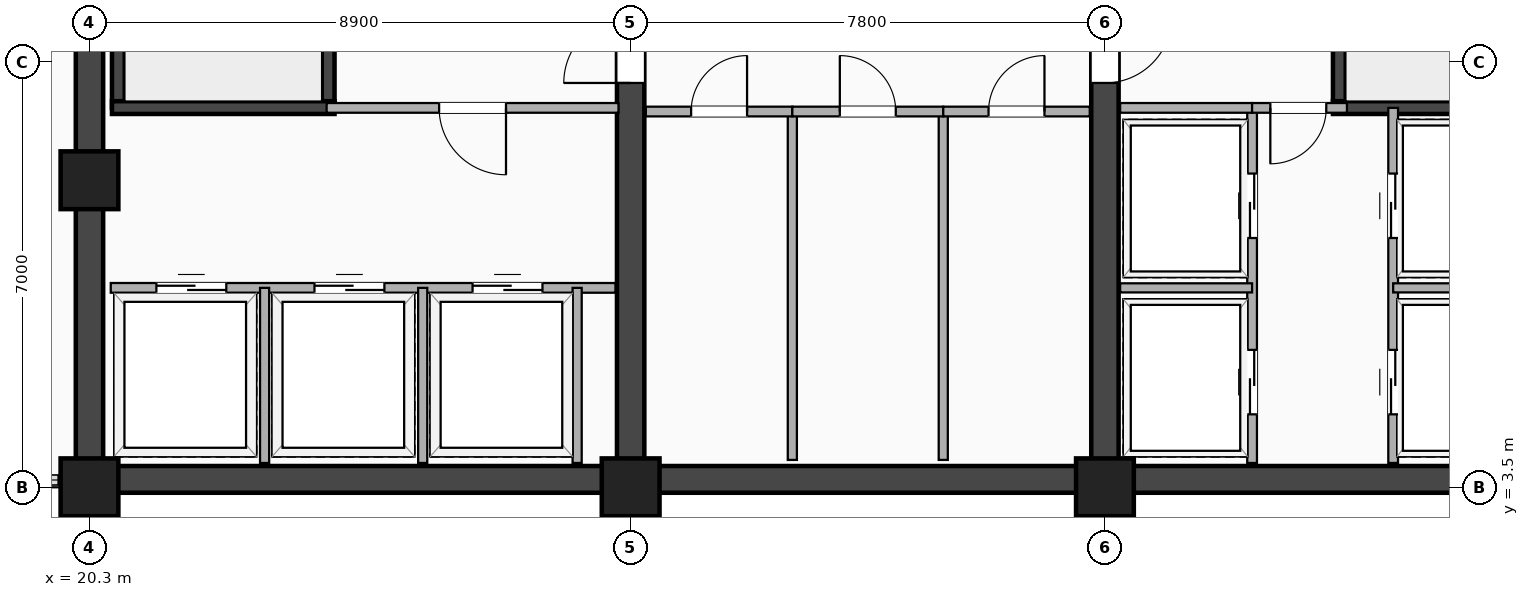
"""IFC4 building model, lengths in metres.
Left out: names, types, materials, properties, quantities, classifications, styles, units other than length and angle.
Written with IfcOpenShell. Run it as: python <this file> out.ifc"""

import sys

from ifc_helpers import new_model, si_unit, direction, frame, frame_2d, origin, origin_2d, place, context, subcontext, project, spatial, rectangle, extrude, element, fill, save


model = new_model("IFC4")
c1 = context("Model", 3, precision=1e-05, world=origin(), true_north=direction((0.0, 1.0)))
c2 = subcontext(c1, "Body", "Model", "MODEL_VIEW")
j1 = project(units=[si_unit("LENGTHUNIT", "METRE"), si_unit("PLANEANGLEUNIT", "RADIAN")], contexts=[c1])
p1 = place(None, origin())
s1 = spatial("IfcSite", under=j1, at=p1, CompositionType="ELEMENT")
p2 = place(p1, origin())
s2 = spatial("IfcBuilding", under=s1, at=p2, CompositionType="ELEMENT")
p3 = place(p2, frame((0.0, 0.0, 224.9)))
s3 = spatial("IfcBuildingStorey", under=s2, at=p3, CompositionType="ELEMENT", Elevation=224.9)
p4 = place(p3, frame((20.3, 3.63, 0.0), z_axis=(0.0, 0.0, 1.0), x_axis=(1.0, 0.0, 0.0)))
e1 = element("IfcWall", 1, at=p4, inside=s3, PredefinedType="SHEAR", context=c2, shape_type="SweptSolid", body=[
    extrude(rectangle(XDim=24.5, YDim=0.44, at=frame_2d((12.25, 0.0))), origin(), (0.0, 0.0, 1.0), 3.26),
])
p5 = place(p3, frame((20.3, 3.5, 0.0), z_axis=(0.0, 0.0, 1.0), x_axis=(0.0, 1.0, 0.0)))
e2 = element("IfcWall", 2, at=p5, inside=s3, PredefinedType="SHEAR", context=c2, shape_type="SweptSolid", body=[
    extrude(rectangle(XDim=16.9, YDim=0.45, at=frame_2d((8.45, 0.0))), origin(), (0.0, 0.0, 1.0), 3.26),
])
p6 = place(p3, frame((29.2, 3.5, 0.0), z_axis=(0.0, 0.0, 1.0), x_axis=(0.0, 1.0, 0.0)))
e3 = element("IfcWall", 3, at=p6, inside=s3, PredefinedType="SHEAR", context=c2, shape_type="SweptSolid", body=[
    extrude(rectangle(XDim=14.95, YDim=0.45, at=frame_2d((7.475, 0.0))), origin(), (0.0, 0.0, 1.0), 3.26),
])
p7 = place(p6, frame((7.75, 0.0, 0.0), z_axis=(0.0, 0.0, 1.0), x_axis=(-1.0, 0.0, 0.0)))
e4 = element("IfcOpeningElement", 4, at=p7, cuts=e3, PredefinedType="OPENING", context=c2, shape_type="SweptSolid", body=[
    extrude(rectangle(XDim=1.1, YDim=2.15, at=frame_2d((0.55, 1.075))), frame((0.0, 0.235, 0.0), z_axis=(0.0, -1.0, 0.0), x_axis=(1.0, 0.0, 0.0)), (0.0, 0.0, 1.0), 0.47),
])
p8 = place(p3, frame((37.0, 3.5, 0.0), z_axis=(0.0, 0.0, 1.0), x_axis=(0.0, 1.0, 0.0)))
e5 = element("IfcWall", 5, at=p8, inside=s3, PredefinedType="SHEAR", context=c2, shape_type="SweptSolid", body=[
    extrude(rectangle(XDim=14.95, YDim=0.45, at=frame_2d((7.475, 0.0))), origin(), (0.0, 0.0, 1.0), 3.26),
])
p9 = place(p8, frame((6.65, 0.0, 0.0)))
e6 = element("IfcOpeningElement", 6, at=p9, cuts=e5, PredefinedType="OPENING", context=c2, shape_type="SweptSolid", body=[
    extrude(rectangle(XDim=1.1, YDim=2.15, at=frame_2d((0.55, 1.075))), frame((0.0, 0.235, 0.0), z_axis=(0.0, -1.0, 0.0), x_axis=(1.0, 0.0, 0.0)), (0.0, 0.0, 1.0), 0.47),
])
for number, where, z_axis, x_axis in (
    (7, (20.775, 9.745, 0.0), (0.0, 0.0, 1.0), (0.0, 1.0, 0.0)),
    (8, (24.225, 9.745, 0.0), (0.0, 0.0, 1.0), (0.0, 1.0, 0.0)),
):
    element("IfcWall", number, at=place(p3, frame(where, z_axis=z_axis, x_axis=x_axis)), inside=s3, PredefinedType="SHEAR", context=c2, shape_type="SweptSolid", body=[
        extrude(rectangle(XDim=8.01, YDim=0.21, at=frame_2d((4.005, 0.0))), origin(), (0.0, 0.0, 1.0), 3.26),
    ])
p10 = place(p3, frame((20.67, 9.745, 0.0), z_axis=(0.0, 0.0, 1.0), x_axis=(1.0, 0.0, 0.0)))
e9 = element("IfcWall", 9, at=p10, inside=s3, PredefinedType="SHEAR", context=c2, shape_type="SweptSolid", body=[
    extrude(rectangle(XDim=3.66, YDim=0.21, at=frame_2d((1.83, 0.0))), origin(), (0.0, 0.0, 1.0), 3.26),
])
p11 = place(p3, frame((40.855, 9.745, 0.0), z_axis=(0.0, 0.0, 1.0), x_axis=(0.0, 1.0, 0.0)))
e10 = element("IfcWall", 10, at=p11, inside=s3, PredefinedType="SHEAR", context=c2, shape_type="SweptSolid", body=[
    extrude(rectangle(XDim=8.01, YDim=0.21, at=frame_2d((4.005, 0.0))), origin(), (0.0, 0.0, 1.0), 3.26),
])
p12 = place(p3, frame((40.75, 9.745, 0.0), z_axis=(0.0, 0.0, 1.0), x_axis=(1.0, 0.0, 0.0)))
e11 = element("IfcWall", 11, at=p12, inside=s3, PredefinedType="SHEAR", context=c2, shape_type="SweptSolid", body=[
    extrude(rectangle(XDim=3.66, YDim=0.21, at=frame_2d((1.83, 0.0))), origin(), (0.0, 0.0, 1.0), 3.26),
])
for number, where, z_axis, x_axis in (
    (12, (20.3, 3.5, -0.24), (0.0, 0.0, 1.0), (1.0, 0.0, 0.0)),
    (13, (29.2, 3.5, -0.24), (0.0, 0.0, 1.0), (1.0, 0.0, 0.0)),
    (14, (37.0, 3.5, -0.24), (0.0, 0.0, 1.0), (1.0, 0.0, 0.0)),
    (15, (20.3, 8.55, -0.24), (0.0, 0.0, 1.0), (1.0, 0.0, 0.0)),
):
    element("IfcColumn", number, at=place(p3, frame(where, z_axis=z_axis, x_axis=x_axis)), inside=s3, PredefinedType="COLUMN", context=c2, shape_type="SweptSolid", body=[
        extrude(rectangle(XDim=0.95, YDim=0.95, at=origin_2d()), origin(), (0.0, 0.0, 1.0), 3.5),
    ])
p13 = place(p3, frame((20.65, 6.78, 0.0), z_axis=(0.0, 0.0, 1.0), x_axis=(1.0, 0.0, 0.0)))
e16 = element("IfcWall", 16, at=p13, inside=s3, PredefinedType="PARTITIONING", context=c2, shape_type="SweptSolid", body=[
    extrude(rectangle(XDim=8.3, YDim=0.16, at=frame_2d((4.15, 0.0))), origin(), (0.0, 0.0, 1.0), 2.472),
])
p14 = place(p13, frame((0.75, 0.0, 0.0)))
e17 = element("IfcOpeningElement", 17, at=p14, cuts=e16, PredefinedType="OPENING", context=c2, shape_type="SweptSolid", body=[
    extrude(rectangle(XDim=1.15, YDim=2.2, at=frame_2d((0.575, 1.1))), frame((0.0, 0.09, 0.0), z_axis=(0.0, -1.0, 0.0), x_axis=(1.0, 0.0, 0.0)), (0.0, 0.0, 1.0), 0.18),
])
p15 = place(p13, frame((3.35, 0.0, 0.0)))
e18 = element("IfcOpeningElement", 18, at=p15, cuts=e16, PredefinedType="OPENING", context=c2, shape_type="SweptSolid", body=[
    extrude(rectangle(XDim=1.15, YDim=2.2, at=frame_2d((0.575, 1.1))), frame((0.0, 0.09, 0.0), z_axis=(0.0, -1.0, 0.0), x_axis=(1.0, 0.0, 0.0)), (0.0, 0.0, 1.0), 0.18),
])
p16 = place(p13, frame((5.95, 0.0, 0.0)))
e19 = element("IfcOpeningElement", 19, at=p16, cuts=e16, PredefinedType="OPENING", context=c2, shape_type="SweptSolid", body=[
    extrude(rectangle(XDim=1.15, YDim=2.2, at=frame_2d((0.575, 1.1))), frame((0.0, 0.09, 0.0), z_axis=(0.0, -1.0, 0.0), x_axis=(1.0, 0.0, 0.0)), (0.0, 0.0, 1.0), 0.18),
])
for number, where, z_axis, x_axis in (
    (20, (23.18, 3.9, 0.0), (0.0, 0.0, 1.0), (0.0, 1.0, 0.0)),
    (21, (25.78, 3.9, 0.0), (0.0, 0.0, 1.0), (0.0, 1.0, 0.0)),
    (22, (28.32, 3.9, 0.0), (0.0, 0.0, 1.0), (0.0, 1.0, 0.0)),
):
    element("IfcWall", number, at=place(p3, frame(where, z_axis=z_axis, x_axis=x_axis)), inside=s3, PredefinedType="PARTITIONING", context=c2, shape_type="SweptSolid", body=[
        extrude(rectangle(XDim=2.88, YDim=0.15, at=frame_2d((1.44, 0.0))), origin(), (0.0, 0.0, 1.0), 3.26),
    ])
p17 = place(p3, frame((24.2, 9.74, 0.0), z_axis=(0.0, 0.0, 1.0), x_axis=(1.0, 0.0, 0.0)))
e23 = element("IfcWall", 23, at=p17, inside=s3, PredefinedType="PARTITIONING", context=c2, shape_type="SweptSolid", body=[
    extrude(rectangle(XDim=4.8, YDim=0.16, at=frame_2d((2.4, 0.0))), origin(), (0.0, 0.0, 1.0), 3.26),
])
p18 = place(p17, frame((1.85, 0.0, 0.0)))
e24 = element("IfcOpeningElement", 24, at=p18, cuts=e23, PredefinedType="OPENING", context=c2, shape_type="SweptSolid", body=[
    extrude(rectangle(XDim=1.1, YDim=2.15, at=frame_2d((0.55, 1.075))), frame((0.0, 0.09, 0.0), z_axis=(0.0, -1.0, 0.0), x_axis=(1.0, 0.0, 0.0)), (0.0, 0.0, 1.0), 0.18),
])
p19 = place(p3, frame((39.42, 3.9, 0.0), z_axis=(0.0, 0.0, 1.0), x_axis=(0.0, 1.0, 0.0)))
e25 = element("IfcWall", 25, at=p19, inside=s3, PredefinedType="PARTITIONING", context=c2, shape_type="SweptSolid", body=[
    extrude(rectangle(XDim=5.84, YDim=0.16, at=frame_2d((2.92, 0.0))), origin(), (0.0, 0.0, 1.0), 3.26),
])
p20 = place(p19, frame((1.86, 0.0, 0.0), z_axis=(0.0, 0.0, 1.0), x_axis=(-1.0, 0.0, 0.0)))
e26 = element("IfcOpeningElement", 26, at=p20, cuts=e25, PredefinedType="OPENING", context=c2, shape_type="SweptSolid", body=[
    extrude(rectangle(XDim=1.06, YDim=2.16, at=frame_2d((0.53, 1.08))), frame((0.0, 0.09, 0.0), z_axis=(0.0, -1.0, 0.0), x_axis=(1.0, 0.0, 0.0)), (0.0, 0.0, 1.0), 0.18),
])
p21 = place(p19, frame((4.76, 0.0, 0.0), z_axis=(0.0, 0.0, 1.0), x_axis=(-1.0, 0.0, 0.0)))
e27 = element("IfcOpeningElement", 27, at=p21, cuts=e25, PredefinedType="OPENING", context=c2, shape_type="SweptSolid", body=[
    extrude(rectangle(XDim=1.06, YDim=2.16, at=frame_2d((0.53, 1.08))), frame((0.0, 0.09, 0.0), z_axis=(0.0, -1.0, 0.0), x_axis=(1.0, 0.0, 0.0)), (0.0, 0.0, 1.0), 0.18),
])
p22 = place(p3, frame((41.74, 3.9, 0.0), z_axis=(0.0, 0.0, 1.0), x_axis=(0.0, 1.0, 0.0)))
e28 = element("IfcWall", 28, at=p22, inside=s3, PredefinedType="PARTITIONING", context=c2, shape_type="SweptSolid", body=[
    extrude(rectangle(XDim=5.84, YDim=0.16, at=frame_2d((2.92, 0.0))), origin(), (0.0, 0.0, 1.0), 3.26),
])
p23 = place(p22, frame((0.8, 0.0, 0.0)))
e29 = element("IfcOpeningElement", 29, at=p23, cuts=e28, PredefinedType="OPENING", context=c2, shape_type="SweptSolid", body=[
    extrude(rectangle(XDim=1.06, YDim=2.16, at=frame_2d((0.53, 1.08))), frame((0.0, 0.09, 0.0), z_axis=(0.0, -1.0, 0.0), x_axis=(1.0, 0.0, 0.0)), (0.0, 0.0, 1.0), 0.18),
])
p24 = place(p22, frame((3.7, 0.0, 0.0)))
e30 = element("IfcOpeningElement", 30, at=p24, cuts=e28, PredefinedType="OPENING", context=c2, shape_type="SweptSolid", body=[
    extrude(rectangle(XDim=1.06, YDim=2.16, at=frame_2d((0.53, 1.08))), frame((0.0, 0.09, 0.0), z_axis=(0.0, -1.0, 0.0), x_axis=(1.0, 0.0, 0.0)), (0.0, 0.0, 1.0), 0.18),
])
p25 = place(p3, frame((37.25, 6.78, 0.0), z_axis=(0.0, 0.0, 1.0), x_axis=(1.0, 0.0, 0.0)))
e31 = element("IfcWall", 31, at=p25, inside=s3, PredefinedType="PARTITIONING", context=c2, shape_type="SweptSolid", body=[
    extrude(rectangle(XDim=2.17, YDim=0.15, at=frame_2d((1.085, 0.0))), origin(), (0.0, 0.0, 1.0), 3.26),
])
p26 = place(p3, frame((41.74, 6.78, 0.0), z_axis=(0.0, 0.0, 1.0), x_axis=(1.0, 0.0, 0.0)))
e32 = element("IfcWall", 32, at=p26, inside=s3, PredefinedType="PARTITIONING", context=c2, shape_type="SweptSolid", body=[
    extrude(rectangle(XDim=2.66, YDim=0.15, at=frame_2d((1.33, 0.0))), origin(), (0.0, 0.0, 1.0), 2.472),
])
p27 = place(p3, frame((37.25, 9.74, 0.0), z_axis=(0.0, 0.0, 1.0), x_axis=(1.0, 0.0, 0.0)))
e33 = element("IfcWall", 33, at=p27, inside=s3, PredefinedType="PARTITIONING", context=c2, shape_type="SweptSolid", body=[
    extrude(rectangle(XDim=2.17, YDim=0.16, at=frame_2d((1.085, 0.0))), origin(), (0.0, 0.0, 1.0), 3.26),
])
p28 = place(p3, frame((39.42, 9.74, 0.0), z_axis=(0.0, 0.0, 1.0), x_axis=(1.0, 0.0, 0.0)))
e34 = element("IfcWall", 34, at=p28, inside=s3, PredefinedType="PARTITIONING", context=c2, shape_type="SweptSolid", body=[
    extrude(rectangle(XDim=1.56, YDim=0.16, at=frame_2d((0.78, 0.0))), origin(), (0.0, 0.0, 1.0), 3.26),
])
p29 = place(p28, frame((0.3, 0.0, 0.0)))
e35 = element("IfcOpeningElement", 35, at=p29, cuts=e34, PredefinedType="OPENING", context=c2, shape_type="SweptSolid", body=[
    extrude(rectangle(XDim=0.92, YDim=2.08, at=frame_2d((0.46, 1.04))), frame((0.0, 0.09, 0.0), z_axis=(0.0, -1.0, 0.0), x_axis=(1.0, 0.0, 0.0)), (0.0, 0.0, 1.0), 0.18),
])
p30 = place(p3, frame((31.859, 3.95, 0.0), z_axis=(0.0, 0.0, 1.0), x_axis=(0.0, 1.0, 0.0)))
e36 = element("IfcWall", 36, at=p30, inside=s3, PredefinedType="PARTITIONING", context=c2, shape_type="SweptSolid", body=[
    extrude(rectangle(XDim=5.73, YDim=0.15, at=frame_2d((2.865, 0.0))), origin(), (0.0, 0.0, 1.0), 3.26),
])
p31 = place(p3, frame((29.45, 9.68, 0.0), z_axis=(0.0, 0.0, 1.0), x_axis=(1.0, 0.0, 0.0)))
e37 = element("IfcWall", 37, at=p31, inside=s3, PredefinedType="PARTITIONING", context=c2, shape_type="SweptSolid", body=[
    extrude(rectangle(XDim=2.409, YDim=0.16, at=frame_2d((1.205, 0.0))), origin(), (0.0, 0.0, 1.0), 3.26),
])
p32 = place(p31, frame((1.664, 0.0, 0.0), z_axis=(0.0, 0.0, 1.0), x_axis=(-1.0, 0.0, 0.0)))
e38 = element("IfcOpeningElement", 38, at=p32, cuts=e37, PredefinedType="OPENING", context=c2, shape_type="SweptSolid", body=[
    extrude(rectangle(XDim=0.92, YDim=2.08, at=frame_2d((0.46, 1.04))), frame((0.0, 0.09, 0.0), z_axis=(0.0, -1.0, 0.0), x_axis=(1.0, 0.0, 0.0)), (0.0, 0.0, 1.0), 0.18),
])
p33 = place(p3, frame((34.341, 3.95, 0.0), z_axis=(0.0, 0.0, 1.0), x_axis=(0.0, 1.0, 0.0)))
e39 = element("IfcWall", 39, at=p33, inside=s3, PredefinedType="PARTITIONING", context=c2, shape_type="SweptSolid", body=[
    extrude(rectangle(XDim=5.73, YDim=0.15, at=frame_2d((2.865, 0.0))), origin(), (0.0, 0.0, 1.0), 3.26),
])
p34 = place(p3, frame((31.859, 9.68, 0.0), z_axis=(0.0, 0.0, 1.0), x_axis=(1.0, 0.0, 0.0)))
e40 = element("IfcWall", 40, at=p34, inside=s3, PredefinedType="PARTITIONING", context=c2, shape_type="SweptSolid", body=[
    extrude(rectangle(XDim=2.482, YDim=0.16, at=frame_2d((1.241, 0.0))), origin(), (0.0, 0.0, 1.0), 3.26),
])
p35 = place(p34, frame((1.701, 0.0, 0.0), z_axis=(0.0, 0.0, 1.0), x_axis=(-1.0, 0.0, 0.0)))
e41 = element("IfcOpeningElement", 41, at=p35, cuts=e40, PredefinedType="OPENING", context=c2, shape_type="SweptSolid", body=[
    extrude(rectangle(XDim=0.92, YDim=2.08, at=frame_2d((0.46, 1.04))), frame((0.0, 0.09, 0.0), z_axis=(0.0, -1.0, 0.0), x_axis=(1.0, 0.0, 0.0)), (0.0, 0.0, 1.0), 0.18),
])
p36 = place(p3, frame((34.341, 9.68, 0.0), z_axis=(0.0, 0.0, 1.0), x_axis=(1.0, 0.0, 0.0)))
e42 = element("IfcWall", 42, at=p36, inside=s3, PredefinedType="PARTITIONING", context=c2, shape_type="SweptSolid", body=[
    extrude(rectangle(XDim=2.409, YDim=0.16, at=frame_2d((1.205, 0.0))), origin(), (0.0, 0.0, 1.0), 3.26),
])
p37 = place(p36, frame((1.664, 0.0, 0.0), z_axis=(0.0, 0.0, 1.0), x_axis=(-1.0, 0.0, 0.0)))
e43 = element("IfcOpeningElement", 43, at=p37, cuts=e42, PredefinedType="OPENING", context=c2, shape_type="SweptSolid", body=[
    extrude(rectangle(XDim=0.92, YDim=2.08, at=frame_2d((0.46, 1.04))), frame((0.0, 0.09, 0.0), z_axis=(0.0, -1.0, 0.0), x_axis=(1.0, 0.0, 0.0)), (0.0, 0.0, 1.0), 0.18),
])
p38 = place(p7, origin())
e44 = element("IfcDoor", 44, at=p38, inside=s3, OperationType="SINGLE_SWING_LEFT", PredefinedType="DOOR", context=c2, shape_type="SweptSolid", body=[
    extrude(rectangle(XDim=1.1, YDim=2.15, at=frame_2d((0.55, 1.075))), frame((0.0, 0.025, 0.0), z_axis=(0.0, -1.0, 0.0), x_axis=(1.0, 0.0, 0.0)), (0.0, 0.0, 1.0), 0.05),
])
fill(e4, e44)
p39 = place(p9, origin())
e45 = element("IfcDoor", 45, at=p39, inside=s3, OperationType="SINGLE_SWING_RIGHT", PredefinedType="DOOR", context=c2, shape_type="SweptSolid", body=[
    extrude(rectangle(XDim=1.1, YDim=2.15, at=frame_2d((0.55, 1.075))), frame((0.0, 0.025, 0.0), z_axis=(0.0, -1.0, 0.0), x_axis=(1.0, 0.0, 0.0)), (0.0, 0.0, 1.0), 0.05),
])
fill(e6, e45)
p40 = place(p14, origin())
e46 = element("IfcDoor", 46, at=p40, inside=s3, OperationType="DOUBLE_DOOR_SLIDING", PredefinedType="DOOR", context=c2, shape_type="SweptSolid", body=[
    extrude(rectangle(XDim=1.15, YDim=2.2, at=frame_2d((0.575, 1.1))), frame((0.0, 0.025, 0.0), z_axis=(0.0, -1.0, 0.0), x_axis=(1.0, 0.0, 0.0)), (0.0, 0.0, 1.0), 0.05),
])
fill(e17, e46)
p41 = place(p15, origin())
e47 = element("IfcDoor", 47, at=p41, inside=s3, OperationType="DOUBLE_DOOR_SLIDING", PredefinedType="DOOR", context=c2, shape_type="SweptSolid", body=[
    extrude(rectangle(XDim=1.15, YDim=2.2, at=frame_2d((0.575, 1.1))), frame((0.0, 0.025, 0.0), z_axis=(0.0, -1.0, 0.0), x_axis=(1.0, 0.0, 0.0)), (0.0, 0.0, 1.0), 0.05),
])
fill(e18, e47)
p42 = place(p16, origin())
e48 = element("IfcDoor", 48, at=p42, inside=s3, OperationType="DOUBLE_DOOR_SLIDING", PredefinedType="DOOR", context=c2, shape_type="SweptSolid", body=[
    extrude(rectangle(XDim=1.15, YDim=2.2, at=frame_2d((0.575, 1.1))), frame((0.0, 0.025, 0.0), z_axis=(0.0, -1.0, 0.0), x_axis=(1.0, 0.0, 0.0)), (0.0, 0.0, 1.0), 0.05),
])
fill(e19, e48)
p43 = place(p18, origin())
e49 = element("IfcDoor", 49, at=p43, inside=s3, OperationType="SINGLE_SWING_RIGHT", PredefinedType="DOOR", context=c2, shape_type="SweptSolid", body=[
    extrude(rectangle(XDim=1.1, YDim=2.15, at=frame_2d((0.55, 1.075))), frame((0.0, 0.025, 0.0), z_axis=(0.0, -1.0, 0.0), x_axis=(1.0, 0.0, 0.0)), (0.0, 0.0, 1.0), 0.05),
])
fill(e24, e49)
p44 = place(p20, origin())
e50 = element("IfcDoor", 50, at=p44, inside=s3, OperationType="DOUBLE_DOOR_SLIDING", PredefinedType="DOOR", context=c2, shape_type="SweptSolid", body=[
    extrude(rectangle(XDim=1.06, YDim=2.16, at=frame_2d((0.53, 1.08))), frame((0.0, 0.025, 0.0), z_axis=(0.0, -1.0, 0.0), x_axis=(1.0, 0.0, 0.0)), (0.0, 0.0, 1.0), 0.05),
])
fill(e26, e50)
p45 = place(p21, origin())
e51 = element("IfcDoor", 51, at=p45, inside=s3, OperationType="DOUBLE_DOOR_SLIDING", PredefinedType="DOOR", context=c2, shape_type="SweptSolid", body=[
    extrude(rectangle(XDim=1.06, YDim=2.16, at=frame_2d((0.53, 1.08))), frame((0.0, 0.025, 0.0), z_axis=(0.0, -1.0, 0.0), x_axis=(1.0, 0.0, 0.0)), (0.0, 0.0, 1.0), 0.05),
])
fill(e27, e51)
p46 = place(p23, origin())
e52 = element("IfcDoor", 52, at=p46, inside=s3, OperationType="DOUBLE_DOOR_SLIDING", PredefinedType="DOOR", context=c2, shape_type="SweptSolid", body=[
    extrude(rectangle(XDim=1.06, YDim=2.16, at=frame_2d((0.53, 1.08))), frame((0.0, 0.025, 0.0), z_axis=(0.0, -1.0, 0.0), x_axis=(1.0, 0.0, 0.0)), (0.0, 0.0, 1.0), 0.05),
])
fill(e29, e52)
p47 = place(p24, origin())
e53 = element("IfcDoor", 53, at=p47, inside=s3, OperationType="DOUBLE_DOOR_SLIDING", PredefinedType="DOOR", context=c2, shape_type="SweptSolid", body=[
    extrude(rectangle(XDim=1.06, YDim=2.16, at=frame_2d((0.53, 1.08))), frame((0.0, 0.025, 0.0), z_axis=(0.0, -1.0, 0.0), x_axis=(1.0, 0.0, 0.0)), (0.0, 0.0, 1.0), 0.05),
])
fill(e30, e53)
p48 = place(p29, origin())
e54 = element("IfcDoor", 54, at=p48, inside=s3, OperationType="SINGLE_SWING_LEFT", PredefinedType="DOOR", context=c2, shape_type="SweptSolid", body=[
    extrude(rectangle(XDim=0.92, YDim=2.08, at=frame_2d((0.46, 1.04))), frame((0.0, 0.025, 0.0), z_axis=(0.0, -1.0, 0.0), x_axis=(1.0, 0.0, 0.0)), (0.0, 0.0, 1.0), 0.05),
])
fill(e35, e54)
p49 = place(p32, origin())
e55 = element("IfcDoor", 55, at=p49, inside=s3, OperationType="SINGLE_SWING_RIGHT", PredefinedType="DOOR", context=c2, shape_type="SweptSolid", body=[
    extrude(rectangle(XDim=0.92, YDim=2.08, at=frame_2d((0.46, 1.04))), frame((0.0, 0.025, 0.0), z_axis=(0.0, -1.0, 0.0), x_axis=(1.0, 0.0, 0.0)), (0.0, 0.0, 1.0), 0.05),
])
fill(e38, e55)
p50 = place(p35, origin())
e56 = element("IfcDoor", 56, at=p50, inside=s3, OperationType="SINGLE_SWING_LEFT", PredefinedType="DOOR", context=c2, shape_type="SweptSolid", body=[
    extrude(rectangle(XDim=0.92, YDim=2.08, at=frame_2d((0.46, 1.04))), frame((0.0, 0.025, 0.0), z_axis=(0.0, -1.0, 0.0), x_axis=(1.0, 0.0, 0.0)), (0.0, 0.0, 1.0), 0.05),
])
fill(e41, e56)
p51 = place(p37, origin())
e57 = element("IfcDoor", 57, at=p51, inside=s3, OperationType="SINGLE_SWING_RIGHT", PredefinedType="DOOR", context=c2, shape_type="SweptSolid", body=[
    extrude(rectangle(XDim=0.92, YDim=2.08, at=frame_2d((0.46, 1.04))), frame((0.0, 0.025, 0.0), z_axis=(0.0, -1.0, 0.0), x_axis=(1.0, 0.0, 0.0)), (0.0, 0.0, 1.0), 0.05),
])
fill(e43, e57)
save(model, sys.argv[1])
